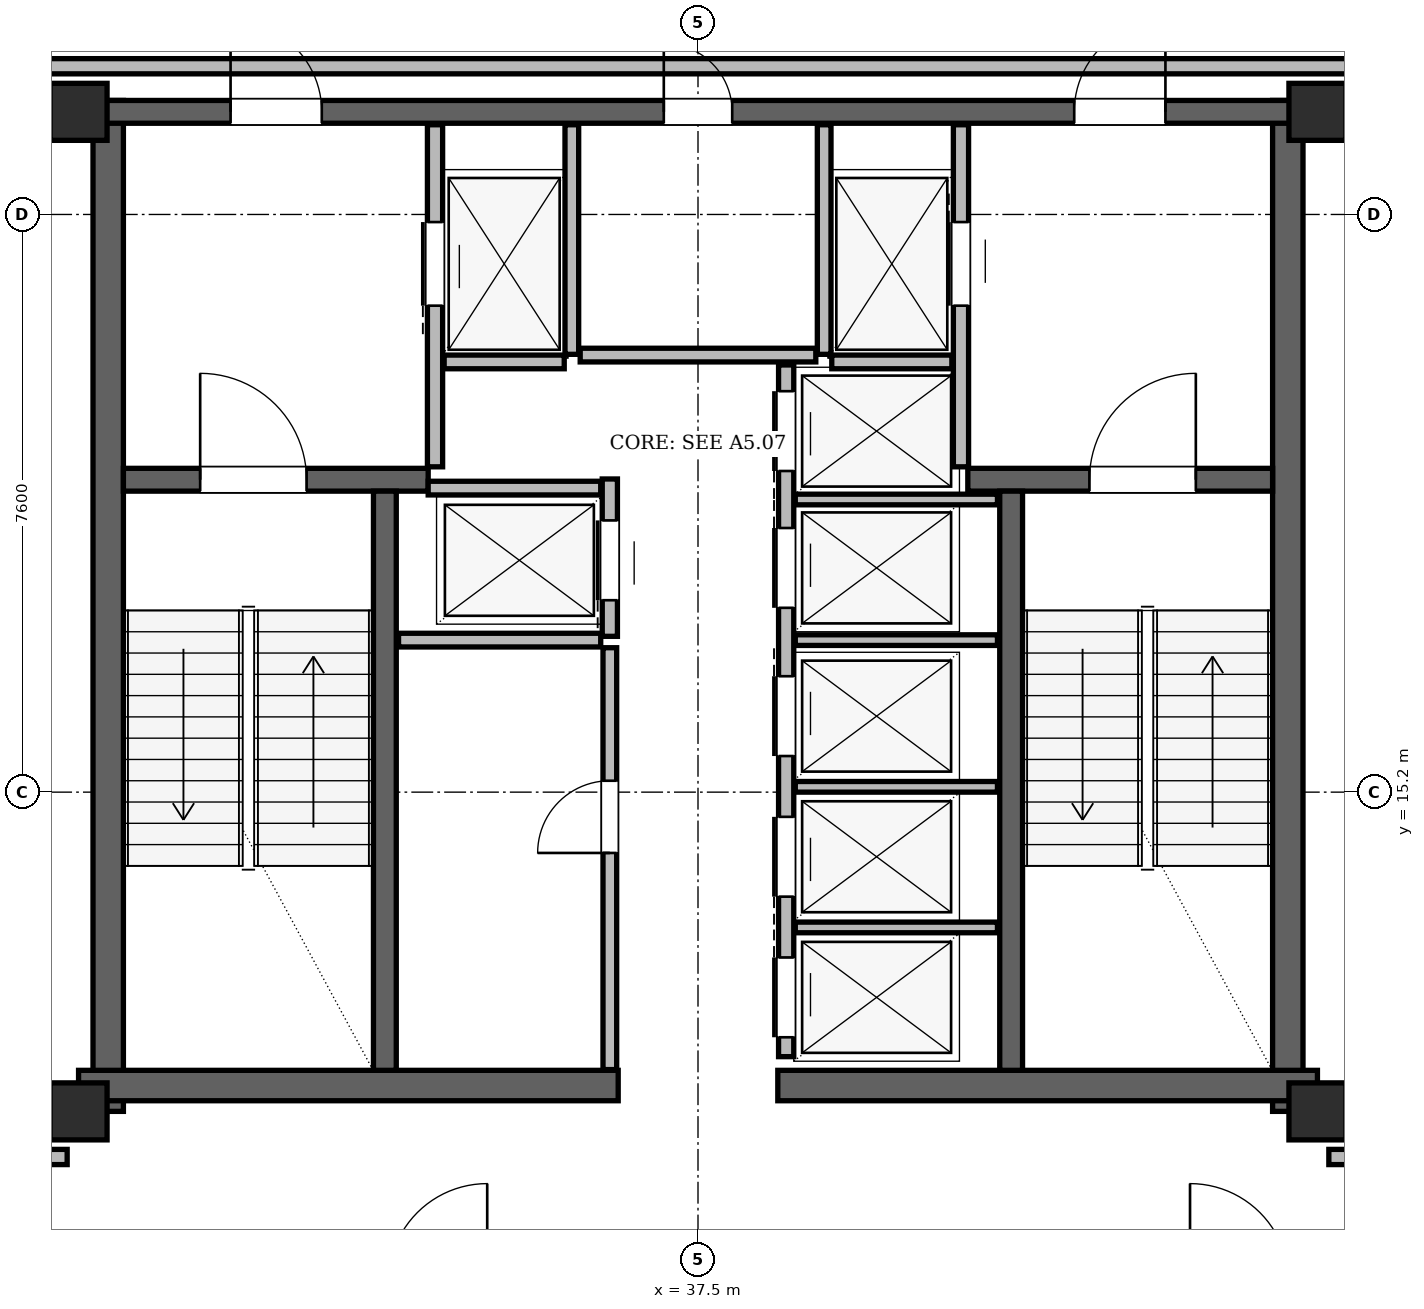
"""IFC4 building model, lengths in metres.
Left out: names, types, materials, properties, quantities, classifications, styles, units other than length and angle.
Written with IfcOpenShell. Run it as: python <this file> out.ifc"""

import sys

from ifc_helpers import new_model, si_unit, direction, frame, frame_2d, origin, origin_2d, place, context, subcontext, project, spatial, rectangle, hollow_rectangle, extrude, element, fill, save


model = new_model("IFC4")
c1 = context("Model", 3, precision=1e-05, world=origin(), true_north=direction((0.0, 1.0)))
c2 = subcontext(c1, "Body", "Model", "MODEL_VIEW")
j1 = project(units=[si_unit("LENGTHUNIT", "METRE"), si_unit("PLANEANGLEUNIT", "RADIAN")], contexts=[c1])
p1 = place(None, origin())
s1 = spatial("IfcSite", under=j1, at=p1, CompositionType="ELEMENT")
p2 = place(p1, origin())
s2 = spatial("IfcBuilding", under=s1, at=p2, CompositionType="ELEMENT")
p3 = place(p2, frame((0.0, 0.0, 204.6)))
s3 = spatial("IfcBuildingStorey", under=s2, at=p3, CompositionType="ELEMENT", Elevation=204.6)
for number, where, z_axis, x_axis in (
    (1, (29.35, 11.0, 0.0), (0.0, 0.0, 1.0), (1.0, 0.0, 0.0)),
    (2, (45.65, 11.0, 0.0), (0.0, 0.0, 1.0), (1.0, 0.0, 0.0)),
    (3, (45.65, 24.15, 0.0), (0.0, 0.0, 1.0), (1.0, 0.0, 0.0)),
    (4, (29.35, 24.15, 0.0), (0.0, 0.0, 1.0), (1.0, 0.0, 0.0)),
):
    element("IfcColumn", number, at=place(p3, frame(where, z_axis=z_axis, x_axis=x_axis)), inside=s3, PredefinedType="COLUMN", context=c2, shape_type="SweptSolid", body=[
        extrude(hollow_rectangle(XDim=0.75, YDim=0.75, WallThickness=0.06, at=origin_2d()), origin(), (0.0, 0.0, 1.0), 4.5),
    ])
for number, where, z_axis, x_axis in (
    (5, (29.74, 11.0, 0.0), (0.0, 0.0, 1.0), (0.0, 1.0, 0.0)),
    (6, (45.26, 11.0, 0.0), (0.0, 0.0, 1.0), (0.0, 1.0, 0.0)),
):
    element("IfcWall", number, at=place(p3, frame(where, z_axis=z_axis, x_axis=x_axis)), inside=s3, PredefinedType="SHEAR", context=c2, shape_type="SweptSolid", body=[
        extrude(rectangle(XDim=13.3, YDim=0.4, at=frame_2d((6.65, 0.0))), origin(), (0.0, 0.0, 1.0), 4.28),
    ])
for number, where, z_axis, x_axis in (
    (7, (29.35, 11.34, 0.0), (0.0, 0.0, 1.0), (1.0, 0.0, 0.0)),
    (8, (38.55, 11.34, 0.0), (0.0, 0.0, 1.0), (1.0, 0.0, 0.0)),
):
    element("IfcWall", number, at=place(p3, frame(where, z_axis=z_axis, x_axis=x_axis)), inside=s3, PredefinedType="SHEAR", context=c2, shape_type="SweptSolid", body=[
        extrude(rectangle(XDim=7.1, YDim=0.4, at=frame_2d((3.55, 0.0))), origin(), (0.0, 0.0, 1.0), 4.28),
    ])
p4 = place(p3, frame((29.65, 24.15, 0.0), z_axis=(0.0, 0.0, 1.0), x_axis=(1.0, 0.0, 0.0)))
e9 = element("IfcWall", 9, at=p4, inside=s3, PredefinedType="SHEAR", context=c2, shape_type="SweptSolid", body=[
    extrude(rectangle(XDim=15.7, YDim=0.3, at=frame_2d((7.85, 0.0))), origin(), (0.0, 0.0, 1.0), 4.28),
])
p5 = place(p4, frame((1.7, 0.0, 0.0)))
e10 = element("IfcOpeningElement", 10, at=p5, cuts=e9, PredefinedType="OPENING", context=c2, shape_type="SweptSolid", body=[
    extrude(rectangle(XDim=1.2, YDim=2.2, at=frame_2d((0.6, 1.1))), frame((0.0, 0.15, 0.0), z_axis=(0.0, -1.0, 0.0), x_axis=(1.0, 0.0, 0.0)), (0.0, 0.0, 1.0), 0.3),
])
p6 = place(p4, frame((12.8, 0.0, 0.0)))
e11 = element("IfcOpeningElement", 11, at=p6, cuts=e9, PredefinedType="OPENING", context=c2, shape_type="SweptSolid", body=[
    extrude(rectangle(XDim=1.2, YDim=2.2, at=frame_2d((0.6, 1.1))), frame((0.0, 0.15, 0.0), z_axis=(0.0, -1.0, 0.0), x_axis=(1.0, 0.0, 0.0)), (0.0, 0.0, 1.0), 0.3),
])
p7 = place(p4, frame((7.4, 0.0, 0.0)))
e12 = element("IfcOpeningElement", 12, at=p7, cuts=e9, PredefinedType="OPENING", context=c2, shape_type="SweptSolid", body=[
    extrude(rectangle(XDim=0.9, YDim=2.05, at=frame_2d((0.45, 1.025))), frame((0.0, 0.15, 0.0), z_axis=(0.0, -1.0, 0.0), x_axis=(1.0, 0.0, 0.0)), (0.0, 0.0, 1.0), 0.3),
])
p8 = place(p3, frame((29.94, 19.31, 0.0), z_axis=(0.0, 0.0, 1.0), x_axis=(1.0, 0.0, 0.0)))
e13 = element("IfcWall", 13, at=p8, inside=s3, PredefinedType="SHEAR", context=c2, shape_type="SweptSolid", body=[
    extrude(rectangle(XDim=4.01, YDim=0.3, at=frame_2d((2.005, 0.0))), origin(), (0.0, 0.0, 1.0), 4.28),
])
p9 = place(p8, frame((1.01, 0.0, 0.0)))
e14 = element("IfcOpeningElement", 14, at=p9, cuts=e13, PredefinedType="OPENING", context=c2, shape_type="SweptSolid", body=[
    extrude(rectangle(XDim=1.4, YDim=2.2, at=frame_2d((0.7, 1.1))), frame((0.0, 0.15, 0.0), z_axis=(0.0, -1.0, 0.0), x_axis=(1.0, 0.0, 0.0)), (0.0, 0.0, 1.0), 0.3),
])
p10 = place(p3, frame((41.05, 19.31, 0.0), z_axis=(0.0, 0.0, 1.0), x_axis=(1.0, 0.0, 0.0)))
e15 = element("IfcWall", 15, at=p10, inside=s3, PredefinedType="SHEAR", context=c2, shape_type="SweptSolid", body=[
    extrude(rectangle(XDim=4.01, YDim=0.3, at=frame_2d((2.005, 0.0))), origin(), (0.0, 0.0, 1.0), 4.28),
])
p11 = place(p10, frame((1.6, 0.0, 0.0)))
e16 = element("IfcOpeningElement", 16, at=p11, cuts=e15, PredefinedType="OPENING", context=c2, shape_type="SweptSolid", body=[
    extrude(rectangle(XDim=1.4, YDim=2.2, at=frame_2d((0.7, 1.1))), frame((0.0, 0.15, 0.0), z_axis=(0.0, -1.0, 0.0), x_axis=(1.0, 0.0, 0.0)), (0.0, 0.0, 1.0), 0.3),
])
for number, where, z_axis, x_axis in (
    (17, (33.38, 11.54, 0.0), (0.0, 0.0, 1.0), (0.0, 1.0, 0.0)),
    (18, (41.62, 11.54, 0.0), (0.0, 0.0, 1.0), (0.0, 1.0, 0.0)),
):
    element("IfcWall", number, at=place(p3, frame(where, z_axis=z_axis, x_axis=x_axis)), inside=s3, PredefinedType="SHEAR", context=c2, shape_type="SweptSolid", body=[
        extrude(rectangle(XDim=7.62, YDim=0.3, at=frame_2d((3.81, 0.0))), origin(), (0.0, 0.0, 1.0), 4.28),
    ])
p12 = place(p3, frame((34.04, 19.48, 0.0), z_axis=(0.0, 0.0, 1.0), x_axis=(0.0, 1.0, 0.0)))
e19 = element("IfcWall", 19, at=p12, inside=s3, PredefinedType="PARTITIONING", context=c2, shape_type="SweptSolid", body=[
    extrude(rectangle(XDim=4.5, YDim=0.2, at=frame_2d((2.25, 0.0))), origin(), (0.0, 0.0, 1.0), 4.28),
])
p13 = place(p12, frame((2.12, 0.0, 0.0)))
e20 = element("IfcOpeningElement", 20, at=p13, cuts=e19, PredefinedType="OPENING", context=c2, shape_type="SweptSolid", body=[
    extrude(rectangle(XDim=1.1, YDim=2.2, at=frame_2d((0.55, 1.1))), frame((0.0, 0.1, 0.0), z_axis=(0.0, -1.0, 0.0), x_axis=(1.0, 0.0, 0.0)), (0.0, 0.0, 1.0), 0.2),
])
p14 = place(p3, frame((35.84, 20.96, 0.0), z_axis=(0.0, 0.0, 1.0), x_axis=(0.0, 1.0, 0.0)))
e21 = element("IfcWall", 21, at=p14, inside=s3, PredefinedType="PARTITIONING", context=c2, shape_type="SweptSolid", body=[
    extrude(rectangle(XDim=3.02, YDim=0.18, at=frame_2d((1.51, 0.0))), origin(), (0.0, 0.0, 1.0), 4.28),
])
p15 = place(p3, frame((34.16, 20.86, 0.0), z_axis=(0.0, 0.0, 1.0), x_axis=(1.0, 0.0, 0.0)))
e22 = element("IfcWall", 22, at=p15, inside=s3, PredefinedType="PARTITIONING", context=c2, shape_type="SweptSolid", body=[
    extrude(rectangle(XDim=1.58, YDim=0.18, at=frame_2d((0.79, 0.0))), origin(), (0.0, 0.0, 1.0), 4.28),
])
p16 = place(p3, frame((40.96, 19.48, 0.0), z_axis=(0.0, 0.0, 1.0), x_axis=(0.0, 1.0, 0.0)))
e23 = element("IfcWall", 23, at=p16, inside=s3, PredefinedType="PARTITIONING", context=c2, shape_type="SweptSolid", body=[
    extrude(rectangle(XDim=4.5, YDim=0.2, at=frame_2d((2.25, 0.0))), origin(), (0.0, 0.0, 1.0), 4.28),
])
p17 = place(p16, frame((2.12, 0.0, 0.0)))
e24 = element("IfcOpeningElement", 24, at=p17, cuts=e23, PredefinedType="OPENING", context=c2, shape_type="SweptSolid", body=[
    extrude(rectangle(XDim=1.1, YDim=2.2, at=frame_2d((0.55, 1.1))), frame((0.0, 0.1, 0.0), z_axis=(0.0, -1.0, 0.0), x_axis=(1.0, 0.0, 0.0)), (0.0, 0.0, 1.0), 0.2),
])
p18 = place(p3, frame((39.16, 20.96, 0.0), z_axis=(0.0, 0.0, 1.0), x_axis=(0.0, 1.0, 0.0)))
e25 = element("IfcWall", 25, at=p18, inside=s3, PredefinedType="PARTITIONING", context=c2, shape_type="SweptSolid", body=[
    extrude(rectangle(XDim=3.02, YDim=0.18, at=frame_2d((1.51, 0.0))), origin(), (0.0, 0.0, 1.0), 4.28),
])
p19 = place(p3, frame((39.26, 20.86, 0.0), z_axis=(0.0, 0.0, 1.0), x_axis=(1.0, 0.0, 0.0)))
e26 = element("IfcWall", 26, at=p19, inside=s3, PredefinedType="PARTITIONING", context=c2, shape_type="SweptSolid", body=[
    extrude(rectangle(XDim=1.58, YDim=0.18, at=frame_2d((0.79, 0.0))), origin(), (0.0, 0.0, 1.0), 4.28),
])
p20 = place(p3, frame((36.34, 17.25, 0.0), z_axis=(0.0, 0.0, 1.0), x_axis=(0.0, 1.0, 0.0)))
e27 = element("IfcWall", 27, at=p20, inside=s3, PredefinedType="PARTITIONING", context=c2, shape_type="SweptSolid", body=[
    extrude(rectangle(XDim=2.07, YDim=0.2, at=frame_2d((1.035, 0.0))), origin(), (0.0, 0.0, 1.0), 4.28),
])
p21 = place(p20, frame((0.475, 0.0, 0.0)))
e28 = element("IfcOpeningElement", 28, at=p21, cuts=e27, PredefinedType="OPENING", context=c2, shape_type="SweptSolid", body=[
    extrude(rectangle(XDim=1.05, YDim=2.15, at=frame_2d((0.525, 1.075))), frame((0.0, 0.1, 0.0), z_axis=(0.0, -1.0, 0.0), x_axis=(1.0, 0.0, 0.0)), (0.0, 0.0, 1.0), 0.2),
])
p22 = place(p3, frame((33.95, 19.2, 0.0), z_axis=(0.0, 0.0, 1.0), x_axis=(1.0, 0.0, 0.0)))
e29 = element("IfcWall", 29, at=p22, inside=s3, PredefinedType="PARTITIONING", context=c2, shape_type="SweptSolid", body=[
    extrude(rectangle(XDim=2.27, YDim=0.18, at=frame_2d((1.135, 0.0))), origin(), (0.0, 0.0, 1.0), 4.28),
])
p23 = place(p3, frame((33.56, 17.2, 0.0), z_axis=(0.0, 0.0, 1.0), x_axis=(1.0, 0.0, 0.0)))
e30 = element("IfcWall", 30, at=p23, inside=s3, PredefinedType="PARTITIONING", context=c2, shape_type="SweptSolid", body=[
    extrude(rectangle(XDim=2.66, YDim=0.18, at=frame_2d((1.33, 0.0))), origin(), (0.0, 0.0, 1.0), 4.28),
])
p24 = place(p3, frame((36.34, 11.55, 0.0), z_axis=(0.0, 0.0, 1.0), x_axis=(0.0, 1.0, 0.0)))
e31 = element("IfcWall", 31, at=p24, inside=s3, PredefinedType="PARTITIONING", context=c2, shape_type="SweptSolid", body=[
    extrude(rectangle(XDim=5.55, YDim=0.18, at=frame_2d((2.775, 0.0))), origin(), (0.0, 0.0, 1.0), 4.28),
])
p25 = place(p24, frame((2.85, 0.0, 0.0)))
e32 = element("IfcOpeningElement", 32, at=p25, cuts=e31, PredefinedType="OPENING", context=c2, shape_type="SweptSolid", body=[
    extrude(rectangle(XDim=0.95, YDim=2.1, at=frame_2d((0.475, 1.05))), frame((0.0, 0.09, 0.0), z_axis=(0.0, -1.0, 0.0), x_axis=(1.0, 0.0, 0.0)), (0.0, 0.0, 1.0), 0.18),
])
p26 = place(p3, frame((38.66, 11.72, 0.0), z_axis=(0.0, 0.0, 1.0), x_axis=(0.0, 1.0, 0.0)))
e33 = element("IfcWall", 33, at=p26, inside=s3, PredefinedType="PARTITIONING", context=c2, shape_type="SweptSolid", body=[
    extrude(rectangle(XDim=9.1, YDim=0.2, at=frame_2d((4.55, 0.0))), origin(), (0.0, 0.0, 1.0), 4.28),
])
p27 = place(p26, frame((0.255, 0.0, 0.0)))
e34 = element("IfcOpeningElement", 34, at=p27, cuts=e33, PredefinedType="OPENING", context=c2, shape_type="SweptSolid", body=[
    extrude(rectangle(XDim=1.05, YDim=2.15, at=frame_2d((0.525, 1.075))), frame((0.0, 0.1, 0.0), z_axis=(0.0, -1.0, 0.0), x_axis=(1.0, 0.0, 0.0)), (0.0, 0.0, 1.0), 0.2),
])
p28 = place(p26, frame((2.105, 0.0, 0.0)))
e35 = element("IfcOpeningElement", 35, at=p28, cuts=e33, PredefinedType="OPENING", context=c2, shape_type="SweptSolid", body=[
    extrude(rectangle(XDim=1.05, YDim=2.15, at=frame_2d((0.525, 1.075))), frame((0.0, 0.1, 0.0), z_axis=(0.0, -1.0, 0.0), x_axis=(1.0, 0.0, 0.0)), (0.0, 0.0, 1.0), 0.2),
])
p29 = place(p26, frame((3.955, 0.0, 0.0)))
e36 = element("IfcOpeningElement", 36, at=p29, cuts=e33, PredefinedType="OPENING", context=c2, shape_type="SweptSolid", body=[
    extrude(rectangle(XDim=1.05, YDim=2.15, at=frame_2d((0.525, 1.075))), frame((0.0, 0.1, 0.0), z_axis=(0.0, -1.0, 0.0), x_axis=(1.0, 0.0, 0.0)), (0.0, 0.0, 1.0), 0.2),
])
p30 = place(p26, frame((5.905, 0.0, 0.0)))
e37 = element("IfcOpeningElement", 37, at=p30, cuts=e33, PredefinedType="OPENING", context=c2, shape_type="SweptSolid", body=[
    extrude(rectangle(XDim=1.05, YDim=2.15, at=frame_2d((0.525, 1.075))), frame((0.0, 0.1, 0.0), z_axis=(0.0, -1.0, 0.0), x_axis=(1.0, 0.0, 0.0)), (0.0, 0.0, 1.0), 0.2),
])
p31 = place(p26, frame((7.705, 0.0, 0.0)))
e38 = element("IfcOpeningElement", 38, at=p31, cuts=e33, PredefinedType="OPENING", context=c2, shape_type="SweptSolid", body=[
    extrude(rectangle(XDim=1.05, YDim=2.15, at=frame_2d((0.525, 1.075))), frame((0.0, 0.1, 0.0), z_axis=(0.0, -1.0, 0.0), x_axis=(1.0, 0.0, 0.0)), (0.0, 0.0, 1.0), 0.2),
])
for number, where, z_axis, x_axis in (
    (39, (38.78, 13.42, 0.0), (0.0, 0.0, 1.0), (1.0, 0.0, 0.0)),
    (40, (38.78, 15.27, 0.0), (0.0, 0.0, 1.0), (1.0, 0.0, 0.0)),
    (41, (38.78, 17.2, 0.0), (0.0, 0.0, 1.0), (1.0, 0.0, 0.0)),
    (42, (38.78, 19.05, 0.0), (0.0, 0.0, 1.0), (1.0, 0.0, 0.0)),
):
    element("IfcWall", number, at=place(p3, frame(where, z_axis=z_axis, x_axis=x_axis)), inside=s3, PredefinedType="PARTITIONING", context=c2, shape_type="SweptSolid", body=[
        extrude(rectangle(XDim=2.66, YDim=0.14, at=frame_2d((1.33, 0.0))), origin(), (0.0, 0.0, 1.0), 4.28),
    ])
p32 = place(p3, frame((35.95, 20.95, 0.0), z_axis=(0.0, 0.0, 1.0), x_axis=(1.0, 0.0, 0.0)))
e43 = element("IfcWall", 43, at=p32, inside=s3, PredefinedType="PARTITIONING", context=c2, shape_type="SweptSolid", body=[
    extrude(rectangle(XDim=3.1, YDim=0.18, at=frame_2d((1.55, 0.0))), origin(), (0.0, 0.0, 1.0), 4.28),
])
for number, where, z_axis, x_axis in (
    (44, (28.62, 10.4, 0.0), (0.0, 0.0, 1.0), (1.0, 0.0, 0.0)),
    (45, (45.8, 10.4, 0.0), (0.0, 0.0, 1.0), (1.0, 0.0, 0.0)),
):
    element("IfcWall", number, at=place(p3, frame(where, z_axis=z_axis, x_axis=x_axis)), inside=s3, PredefinedType="PARTITIONING", context=c2, shape_type="SweptSolid", body=[
        extrude(rectangle(XDim=0.58, YDim=0.2, at=frame_2d((0.29, 0.0))), origin(), (0.0, 0.0, 1.0), 4.28),
    ])
p33 = place(p3, frame((28.62, 24.75, 0.0), z_axis=(0.0, 0.0, 1.0), x_axis=(1.0, 0.0, 0.0)))
e46 = element("IfcWall", 46, at=p33, inside=s3, PredefinedType="PARTITIONING", context=c2, shape_type="SweptSolid", body=[
    extrude(rectangle(XDim=17.76, YDim=0.2, at=frame_2d((8.88, 0.0))), origin(), (0.0, 0.0, 1.0), 3.813),
])
p34 = place(p25, origin())
e47 = element("IfcDoor", 47, at=p34, inside=s3, OperationType="SINGLE_SWING_LEFT", PredefinedType="DOOR", context=c2, shape_type="SweptSolid", body=[
    extrude(rectangle(XDim=0.95, YDim=2.1, at=frame_2d((0.475, 1.05))), frame((0.0, 0.025, 0.0), z_axis=(0.0, -1.0, 0.0), x_axis=(1.0, 0.0, 0.0)), (0.0, 0.0, 1.0), 0.05),
])
fill(e32, e47)
p35 = place(p13, origin())
e48 = element("IfcDoor", 48, at=p35, inside=s3, OperationType="SLIDING_TO_LEFT", PredefinedType="DOOR", context=c2, shape_type="SweptSolid", body=[
    extrude(rectangle(XDim=1.1, YDim=2.2, at=frame_2d((0.55, 1.1))), frame((0.0, 0.025, 0.0), z_axis=(0.0, -1.0, 0.0), x_axis=(1.0, 0.0, 0.0)), (0.0, 0.0, 1.0), 0.05),
])
fill(e20, e48)
p36 = place(p17, origin())
e49 = element("IfcDoor", 49, at=p36, inside=s3, OperationType="SLIDING_TO_RIGHT", PredefinedType="DOOR", context=c2, shape_type="SweptSolid", body=[
    extrude(rectangle(XDim=1.1, YDim=2.2, at=frame_2d((0.55, 1.1))), frame((0.0, 0.025, 0.0), z_axis=(0.0, -1.0, 0.0), x_axis=(1.0, 0.0, 0.0)), (0.0, 0.0, 1.0), 0.05),
])
fill(e24, e49)
p37 = place(p27, origin())
e50 = element("IfcDoor", 50, at=p37, inside=s3, OperationType="SLIDING_TO_RIGHT", PredefinedType="DOOR", context=c2, shape_type="SweptSolid", body=[
    extrude(rectangle(XDim=1.05, YDim=2.15, at=frame_2d((0.525, 1.075))), frame((0.0, 0.025, 0.0), z_axis=(0.0, -1.0, 0.0), x_axis=(1.0, 0.0, 0.0)), (0.0, 0.0, 1.0), 0.05),
])
fill(e34, e50)
p38 = place(p28, origin())
e51 = element("IfcDoor", 51, at=p38, inside=s3, OperationType="SLIDING_TO_LEFT", PredefinedType="DOOR", context=c2, shape_type="SweptSolid", body=[
    extrude(rectangle(XDim=1.05, YDim=2.15, at=frame_2d((0.525, 1.075))), frame((0.0, 0.025, 0.0), z_axis=(0.0, -1.0, 0.0), x_axis=(1.0, 0.0, 0.0)), (0.0, 0.0, 1.0), 0.05),
])
fill(e35, e51)
p39 = place(p29, origin())
e52 = element("IfcDoor", 52, at=p39, inside=s3, OperationType="SLIDING_TO_RIGHT", PredefinedType="DOOR", context=c2, shape_type="SweptSolid", body=[
    extrude(rectangle(XDim=1.05, YDim=2.15, at=frame_2d((0.525, 1.075))), frame((0.0, 0.025, 0.0), z_axis=(0.0, -1.0, 0.0), x_axis=(1.0, 0.0, 0.0)), (0.0, 0.0, 1.0), 0.05),
])
fill(e36, e52)
p40 = place(p21, origin())
e53 = element("IfcDoor", 53, at=p40, inside=s3, OperationType="SLIDING_TO_LEFT", PredefinedType="DOOR", context=c2, shape_type="SweptSolid", body=[
    extrude(rectangle(XDim=1.05, YDim=2.15, at=frame_2d((0.525, 1.075))), frame((0.0, 0.025, 0.0), z_axis=(0.0, -1.0, 0.0), x_axis=(1.0, 0.0, 0.0)), (0.0, 0.0, 1.0), 0.05),
])
fill(e28, e53)
p41 = place(p30, origin())
e54 = element("IfcDoor", 54, at=p41, inside=s3, OperationType="SLIDING_TO_RIGHT", PredefinedType="DOOR", context=c2, shape_type="SweptSolid", body=[
    extrude(rectangle(XDim=1.05, YDim=2.15, at=frame_2d((0.525, 1.075))), frame((0.0, 0.025, 0.0), z_axis=(0.0, -1.0, 0.0), x_axis=(1.0, 0.0, 0.0)), (0.0, 0.0, 1.0), 0.05),
])
fill(e37, e54)
p42 = place(p31, origin())
e55 = element("IfcDoor", 55, at=p42, inside=s3, OperationType="SLIDING_TO_LEFT", PredefinedType="DOOR", context=c2, shape_type="SweptSolid", body=[
    extrude(rectangle(XDim=1.05, YDim=2.15, at=frame_2d((0.525, 1.075))), frame((0.0, 0.025, 0.0), z_axis=(0.0, -1.0, 0.0), x_axis=(1.0, 0.0, 0.0)), (0.0, 0.0, 1.0), 0.05),
])
fill(e38, e55)
p43 = place(p9, origin())
e56 = element("IfcDoor", 56, at=p43, inside=s3, OperationType="SINGLE_SWING_LEFT", PredefinedType="DOOR", context=c2, shape_type="SweptSolid", body=[
    extrude(rectangle(XDim=1.4, YDim=2.2, at=frame_2d((0.7, 1.1))), frame((0.0, 0.025, 0.0), z_axis=(0.0, -1.0, 0.0), x_axis=(1.0, 0.0, 0.0)), (0.0, 0.0, 1.0), 0.05),
])
fill(e14, e56)
p44 = place(p11, origin())
e57 = element("IfcDoor", 57, at=p44, inside=s3, OperationType="SINGLE_SWING_RIGHT", PredefinedType="DOOR", context=c2, shape_type="SweptSolid", body=[
    extrude(rectangle(XDim=1.4, YDim=2.2, at=frame_2d((0.7, 1.1))), frame((0.0, 0.025, 0.0), z_axis=(0.0, -1.0, 0.0), x_axis=(1.0, 0.0, 0.0)), (0.0, 0.0, 1.0), 0.05),
])
fill(e16, e57)
p45 = place(p5, origin())
e58 = element("IfcDoor", 58, at=p45, inside=s3, OperationType="SINGLE_SWING_LEFT", PredefinedType="DOOR", context=c2, shape_type="SweptSolid", body=[
    extrude(rectangle(XDim=1.2, YDim=2.2, at=frame_2d((0.6, 1.1))), frame((0.0, 0.025, 0.0), z_axis=(0.0, -1.0, 0.0), x_axis=(1.0, 0.0, 0.0)), (0.0, 0.0, 1.0), 0.05),
])
fill(e10, e58)
p46 = place(p6, origin())
e59 = element("IfcDoor", 59, at=p46, inside=s3, OperationType="SINGLE_SWING_RIGHT", PredefinedType="DOOR", context=c2, shape_type="SweptSolid", body=[
    extrude(rectangle(XDim=1.2, YDim=2.2, at=frame_2d((0.6, 1.1))), frame((0.0, 0.025, 0.0), z_axis=(0.0, -1.0, 0.0), x_axis=(1.0, 0.0, 0.0)), (0.0, 0.0, 1.0), 0.05),
])
fill(e11, e59)
p47 = place(p7, origin())
e60 = element("IfcDoor", 60, at=p47, inside=s3, OperationType="SINGLE_SWING_LEFT", PredefinedType="DOOR", context=c2, shape_type="SweptSolid", body=[
    extrude(rectangle(XDim=0.9, YDim=2.05, at=frame_2d((0.45, 1.025))), frame((0.0, 0.025, 0.0), z_axis=(0.0, -1.0, 0.0), x_axis=(1.0, 0.0, 0.0)), (0.0, 0.0, 1.0), 0.05),
])
fill(e12, e60)
save(model, sys.argv[1])
